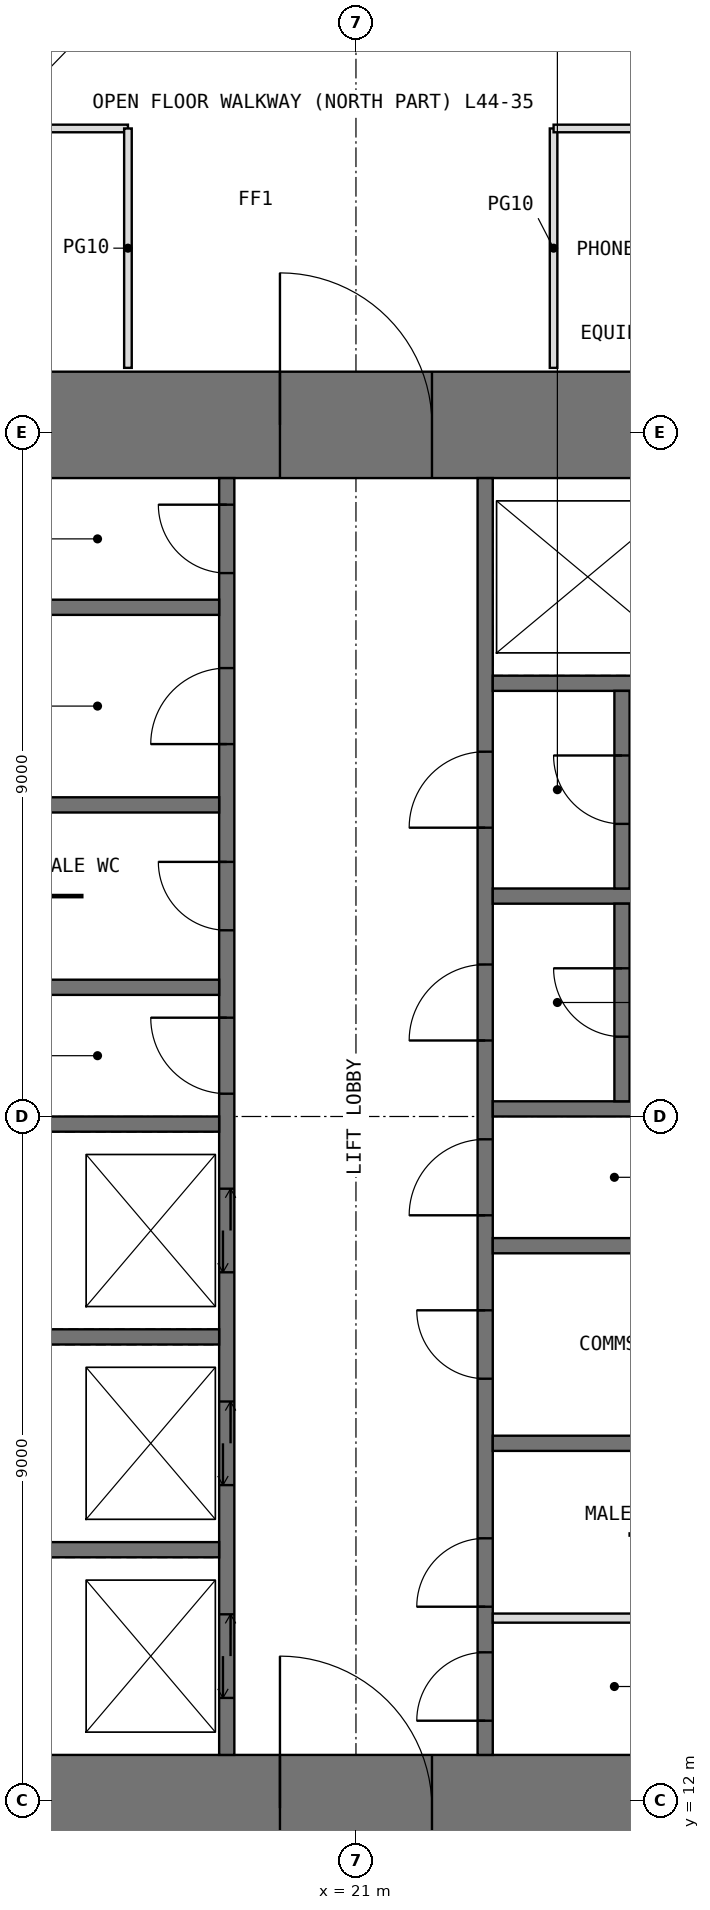
"""IFC4 building model, lengths in metres.
Left out: names, types, materials, properties, quantities, classifications, styles, units other than length and angle.
Written with IfcOpenShell. Run it as: python <this file> out.ifc"""

import sys

from ifc_helpers import new_model, si_unit, direction, frame, frame_2d, origin, place, context, subcontext, project, spatial, rectangle, extrude, element, fill, save


model = new_model("IFC4")
c1 = context("Model", 3, precision=1e-05, world=origin(), true_north=direction((0.0, 1.0)))
c2 = subcontext(c1, "Body", "Model", "MODEL_VIEW")
j1 = project(units=[si_unit("LENGTHUNIT", "METRE"), si_unit("PLANEANGLEUNIT", "RADIAN")], contexts=[c1])
p1 = place(None, origin())
s1 = spatial("IfcSite", under=j1, at=p1, CompositionType="ELEMENT")
p2 = place(p1, origin())
s2 = spatial("IfcBuilding", under=s1, at=p2, CompositionType="ELEMENT")
p3 = place(p2, frame((0.0, 0.0, 186.5)))
s3 = spatial("IfcBuildingStorey", under=s2, at=p3, CompositionType="ELEMENT", Elevation=186.5)
p4 = place(p3, frame((11.2, 11.9, -0.05), z_axis=(0.0, 0.0, 1.0), x_axis=(1.0, 0.0, 0.0)))
e1 = element("IfcWall", 1, at=p4, inside=s3, PredefinedType="SHEAR", context=c2, shape_type="SweptSolid", body=[
    extrude(rectangle(XDim=19.6, YDim=1.4, at=frame_2d((9.8, 0.0))), origin(), (0.0, 0.0, 1.0), 4.0),
])
p5 = place(p4, frame((8.8, 0.0, 0.05)))
e2 = element("IfcOpeningElement", 2, at=p5, cuts=e1, PredefinedType="OPENING", context=c2, shape_type="SweptSolid", body=[
    extrude(rectangle(XDim=2.0, YDim=2.2, at=frame_2d((1.0, 1.1))), frame((0.0, 0.71, 0.0), z_axis=(0.0, -1.0, 0.0), x_axis=(1.0, 0.0, 0.0)), (0.0, 0.0, 1.0), 1.42),
])
p6 = place(p3, frame((11.2, 30.1, -0.05), z_axis=(0.0, 0.0, 1.0), x_axis=(1.0, 0.0, 0.0)))
e3 = element("IfcWall", 3, at=p6, inside=s3, PredefinedType="SHEAR", context=c2, shape_type="SweptSolid", body=[
    extrude(rectangle(XDim=19.6, YDim=1.4, at=frame_2d((9.8, 0.0))), origin(), (0.0, 0.0, 1.0), 4.0),
])
p7 = place(p6, frame((8.8, 0.0, 0.05)))
e4 = element("IfcOpeningElement", 4, at=p7, cuts=e3, PredefinedType="OPENING", context=c2, shape_type="SweptSolid", body=[
    extrude(rectangle(XDim=2.0, YDim=2.2, at=frame_2d((1.0, 1.1))), frame((0.0, 0.71, 0.0), z_axis=(0.0, -1.0, 0.0), x_axis=(1.0, 0.0, 0.0)), (0.0, 0.0, 1.0), 1.42),
])
p8 = place(p3, frame((19.3, 12.6, -0.05), z_axis=(0.0, 0.0, 1.0), x_axis=(0.0, 1.0, 0.0)))
e5 = element("IfcWall", 5, at=p8, inside=s3, PredefinedType="SHEAR", context=c2, shape_type="SweptSolid", body=[
    extrude(rectangle(XDim=16.8, YDim=0.2, at=frame_2d((8.4, 0.0))), origin(), (0.0, 0.0, 1.0), 4.0),
])
p9 = place(p8, frame((8.7, 0.0, 0.05)))
e6 = element("IfcOpeningElement", 6, at=p9, cuts=e5, PredefinedType="OPENING", context=c2, shape_type="SweptSolid", body=[
    extrude(rectangle(XDim=1.0, YDim=2.2, at=frame_2d((0.5, 1.1))), frame((0.0, 0.11, 0.0), z_axis=(0.0, -1.0, 0.0), x_axis=(1.0, 0.0, 0.0)), (0.0, 0.0, 1.0), 0.22),
])
p10 = place(p8, frame((10.85, 0.0, 0.05)))
e7 = element("IfcOpeningElement", 7, at=p10, cuts=e5, PredefinedType="OPENING", context=c2, shape_type="SweptSolid", body=[
    extrude(rectangle(XDim=0.9, YDim=2.2, at=frame_2d((0.45, 1.1))), frame((0.0, 0.11, 0.0), z_axis=(0.0, -1.0, 0.0), x_axis=(1.0, 0.0, 0.0)), (0.0, 0.0, 1.0), 0.22),
])
p11 = place(p8, frame((13.3, 0.0, 0.05)))
e8 = element("IfcOpeningElement", 8, at=p11, cuts=e5, PredefinedType="OPENING", context=c2, shape_type="SweptSolid", body=[
    extrude(rectangle(XDim=1.0, YDim=2.2, at=frame_2d((0.5, 1.1))), frame((0.0, 0.11, 0.0), z_axis=(0.0, -1.0, 0.0), x_axis=(1.0, 0.0, 0.0)), (0.0, 0.0, 1.0), 0.22),
])
p12 = place(p8, frame((15.55, 0.0, 0.05)))
e9 = element("IfcOpeningElement", 9, at=p12, cuts=e5, PredefinedType="OPENING", context=c2, shape_type="SweptSolid", body=[
    extrude(rectangle(XDim=0.9, YDim=2.2, at=frame_2d((0.45, 1.1))), frame((0.0, 0.11, 0.0), z_axis=(0.0, -1.0, 0.0), x_axis=(1.0, 0.0, 0.0)), (0.0, 0.0, 1.0), 0.22),
])
p13 = place(p8, frame((0.75, 0.0, 0.05)))
e10 = element("IfcOpeningElement", 10, at=p13, cuts=e5, PredefinedType="OPENING", context=c2, shape_type="SweptSolid", body=[
    extrude(rectangle(XDim=1.1, YDim=2.2, at=frame_2d((0.55, 1.1))), frame((0.0, 0.11, 0.0), z_axis=(0.0, -1.0, 0.0), x_axis=(1.0, 0.0, 0.0)), (0.0, 0.0, 1.0), 0.22),
])
p14 = place(p8, frame((3.55, 0.0, 0.05)))
e11 = element("IfcOpeningElement", 11, at=p14, cuts=e5, PredefinedType="OPENING", context=c2, shape_type="SweptSolid", body=[
    extrude(rectangle(XDim=1.1, YDim=2.2, at=frame_2d((0.55, 1.1))), frame((0.0, 0.11, 0.0), z_axis=(0.0, -1.0, 0.0), x_axis=(1.0, 0.0, 0.0)), (0.0, 0.0, 1.0), 0.22),
])
p15 = place(p8, frame((6.35, 0.0, 0.05)))
e12 = element("IfcOpeningElement", 12, at=p15, cuts=e5, PredefinedType="OPENING", context=c2, shape_type="SweptSolid", body=[
    extrude(rectangle(XDim=1.1, YDim=2.2, at=frame_2d((0.55, 1.1))), frame((0.0, 0.11, 0.0), z_axis=(0.0, -1.0, 0.0), x_axis=(1.0, 0.0, 0.0)), (0.0, 0.0, 1.0), 0.22),
])
p16 = place(p3, frame((22.7, 12.6, -0.05), z_axis=(0.0, 0.0, 1.0), x_axis=(0.0, 1.0, 0.0)))
e13 = element("IfcWall", 13, at=p16, inside=s3, PredefinedType="SHEAR", context=c2, shape_type="SweptSolid", body=[
    extrude(rectangle(XDim=16.8, YDim=0.2, at=frame_2d((8.4, 0.0))), origin(), (0.0, 0.0, 1.0), 4.0),
])
p17 = place(p16, frame((0.45, 0.0, 0.05)))
e14 = element("IfcOpeningElement", 14, at=p17, cuts=e13, PredefinedType="OPENING", context=c2, shape_type="SweptSolid", body=[
    extrude(rectangle(XDim=0.9, YDim=2.2, at=frame_2d((0.45, 1.1))), frame((0.0, 0.11, 0.0), z_axis=(0.0, -1.0, 0.0), x_axis=(1.0, 0.0, 0.0)), (0.0, 0.0, 1.0), 0.22),
])
p18 = place(p16, frame((7.1, 0.0, 0.05)))
e15 = element("IfcOpeningElement", 15, at=p18, cuts=e13, PredefinedType="OPENING", context=c2, shape_type="SweptSolid", body=[
    extrude(rectangle(XDim=1.0, YDim=2.2, at=frame_2d((0.5, 1.1))), frame((0.0, 0.11, 0.0), z_axis=(0.0, -1.0, 0.0), x_axis=(1.0, 0.0, 0.0)), (0.0, 0.0, 1.0), 0.22),
])
p19 = place(p16, frame((1.95, 0.0, 0.05)))
e16 = element("IfcOpeningElement", 16, at=p19, cuts=e13, PredefinedType="OPENING", context=c2, shape_type="SweptSolid", body=[
    extrude(rectangle(XDim=0.9, YDim=2.2, at=frame_2d((0.45, 1.1))), frame((0.0, 0.11, 0.0), z_axis=(0.0, -1.0, 0.0), x_axis=(1.0, 0.0, 0.0)), (0.0, 0.0, 1.0), 0.22),
])
p20 = place(p16, frame((4.95, 0.0, 0.05)))
e17 = element("IfcOpeningElement", 17, at=p20, cuts=e13, PredefinedType="OPENING", context=c2, shape_type="SweptSolid", body=[
    extrude(rectangle(XDim=0.9, YDim=2.2, at=frame_2d((0.45, 1.1))), frame((0.0, 0.11, 0.0), z_axis=(0.0, -1.0, 0.0), x_axis=(1.0, 0.0, 0.0)), (0.0, 0.0, 1.0), 0.22),
])
p21 = place(p16, frame((9.4, 0.0, 0.05)))
e18 = element("IfcOpeningElement", 18, at=p21, cuts=e13, PredefinedType="OPENING", context=c2, shape_type="SweptSolid", body=[
    extrude(rectangle(XDim=1.0, YDim=2.2, at=frame_2d((0.5, 1.1))), frame((0.0, 0.11, 0.0), z_axis=(0.0, -1.0, 0.0), x_axis=(1.0, 0.0, 0.0)), (0.0, 0.0, 1.0), 0.22),
])
p22 = place(p16, frame((12.2, 0.0, 0.05)))
e19 = element("IfcOpeningElement", 19, at=p22, cuts=e13, PredefinedType="OPENING", context=c2, shape_type="SweptSolid", body=[
    extrude(rectangle(XDim=1.0, YDim=2.2, at=frame_2d((0.5, 1.1))), frame((0.0, 0.11, 0.0), z_axis=(0.0, -1.0, 0.0), x_axis=(1.0, 0.0, 0.0)), (0.0, 0.0, 1.0), 0.22),
])
for number, where, z_axis, x_axis in (
    (20, (16.0, 15.3, -0.05), (0.0, 0.0, 1.0), (1.0, 0.0, 0.0)),
    (21, (16.0, 18.1, -0.05), (0.0, 0.0, 1.0), (1.0, 0.0, 0.0)),
    (22, (16.0, 20.9, -0.05), (0.0, 0.0, 1.0), (1.0, 0.0, 0.0)),
    (23, (16.0, 22.7, -0.05), (0.0, 0.0, 1.0), (1.0, 0.0, 0.0)),
    (24, (16.0, 25.1, -0.05), (0.0, 0.0, 1.0), (1.0, 0.0, 0.0)),
    (25, (16.0, 27.7, -0.05), (0.0, 0.0, 1.0), (1.0, 0.0, 0.0)),
    (26, (22.8, 16.7, -0.05), (0.0, 0.0, 1.0), (1.0, 0.0, 0.0)),
    (27, (22.8, 19.3, -0.05), (0.0, 0.0, 1.0), (1.0, 0.0, 0.0)),
    (28, (22.8, 21.1, -0.05), (0.0, 0.0, 1.0), (1.0, 0.0, 0.0)),
    (29, (22.8, 23.9, -0.05), (0.0, 0.0, 1.0), (1.0, 0.0, 0.0)),
    (30, (22.8, 26.7, -0.05), (0.0, 0.0, 1.0), (1.0, 0.0, 0.0)),
):
    element("IfcWall", number, at=place(p3, frame(where, z_axis=z_axis, x_axis=x_axis)), inside=s3, PredefinedType="SHEAR", context=c2, shape_type="SweptSolid", body=[
        extrude(rectangle(XDim=3.2, YDim=0.2, at=frame_2d((1.6, 0.0))), origin(), (0.0, 0.0, 1.0), 4.0),
    ])
p23 = place(p3, frame((22.8, 14.4, 0.0), z_axis=(0.0, 0.0, 1.0), x_axis=(1.0, 0.0, 0.0)))
e31 = element("IfcWall", 31, at=p23, inside=s3, PredefinedType="PARTITIONING", context=c2, shape_type="SweptSolid", body=[
    extrude(rectangle(XDim=3.2, YDim=0.12, at=frame_2d((1.6, 0.0))), origin(), (0.0, 0.0, 1.0), 3.75),
])
p24 = place(p3, frame((16.0, 23.9, 0.0), z_axis=(0.0, 0.0, 1.0), x_axis=(1.0, 0.0, 0.0)))
e32 = element("IfcWall", 32, at=p24, inside=s3, PredefinedType="PARTITIONING", context=c2, shape_type="SweptSolid", body=[
    extrude(rectangle(XDim=1.4, YDim=0.03, at=frame_2d((0.7, 0.0))), origin(), (0.0, 0.0, 1.0), 3.75),
])
p25 = place(p3, frame((24.5, 21.2, -0.05), z_axis=(0.0, 0.0, 1.0), x_axis=(0.0, 1.0, 0.0)))
e33 = element("IfcWall", 33, at=p25, inside=s3, PredefinedType="SHEAR", context=c2, shape_type="SweptSolid", body=[
    extrude(rectangle(XDim=2.6, YDim=0.2, at=frame_2d((1.3, 0.0))), origin(), (0.0, 0.0, 1.0), 4.0),
])
p26 = place(p25, frame((0.85, 0.0, 0.05)))
e34 = element("IfcOpeningElement", 34, at=p26, cuts=e33, PredefinedType="OPENING", context=c2, shape_type="SweptSolid", body=[
    extrude(rectangle(XDim=0.9, YDim=2.2, at=frame_2d((0.45, 1.1))), frame((0.0, 0.11, 0.0), z_axis=(0.0, -1.0, 0.0), x_axis=(1.0, 0.0, 0.0)), (0.0, 0.0, 1.0), 0.22),
])
p27 = place(p3, frame((24.5, 24.0, -0.05), z_axis=(0.0, 0.0, 1.0), x_axis=(0.0, 1.0, 0.0)))
e35 = element("IfcWall", 35, at=p27, inside=s3, PredefinedType="SHEAR", context=c2, shape_type="SweptSolid", body=[
    extrude(rectangle(XDim=2.6, YDim=0.2, at=frame_2d((1.3, 0.0))), origin(), (0.0, 0.0, 1.0), 4.0),
])
p28 = place(p27, frame((0.85, 0.0, 0.05)))
e36 = element("IfcOpeningElement", 36, at=p28, cuts=e35, PredefinedType="OPENING", context=c2, shape_type="SweptSolid", body=[
    extrude(rectangle(XDim=0.9, YDim=2.2, at=frame_2d((0.45, 1.1))), frame((0.0, 0.11, 0.0), z_axis=(0.0, -1.0, 0.0), x_axis=(1.0, 0.0, 0.0)), (0.0, 0.0, 1.0), 0.22),
])
p29 = place(p3, frame((14.4, 34.0, 0.0), z_axis=(0.0, 0.0, 1.0), x_axis=(1.0, 0.0, 0.0)))
e37 = element("IfcWall", 37, at=p29, inside=s3, PredefinedType="PARTITIONING", context=c2, shape_type="SweptSolid", body=[
    extrude(rectangle(XDim=3.6, YDim=0.1, at=frame_2d((1.8, 0.0))), origin(), (0.0, 0.0, 1.0), 3.75),
])
p30 = place(p29, frame((1.3, 0.0, 0.0)))
e38 = element("IfcOpeningElement", 38, at=p30, cuts=e37, PredefinedType="OPENING", context=c2, shape_type="SweptSolid", body=[
    extrude(rectangle(XDim=1.0, YDim=2.4, at=frame_2d((0.5, 1.2))), frame((0.0, 0.06, 0.0), z_axis=(0.0, -1.0, 0.0), x_axis=(1.0, 0.0, 0.0)), (0.0, 0.0, 1.0), 0.12),
])
for number, where, z_axis, x_axis in (
    (39, (18.0, 30.85, 0.0), (0.0, 0.0, 1.0), (0.0, 1.0, 0.0)),
    (40, (23.6, 30.85, 0.0), (0.0, 0.0, 1.0), (0.0, 1.0, 0.0)),
):
    element("IfcWall", number, at=place(p3, frame(where, z_axis=z_axis, x_axis=x_axis)), inside=s3, PredefinedType="PARTITIONING", context=c2, shape_type="SweptSolid", body=[
        extrude(rectangle(XDim=3.15, YDim=0.1, at=frame_2d((1.575, 0.0))), origin(), (0.0, 0.0, 1.0), 3.75),
    ])
p31 = place(p3, frame((23.6, 34.0, 0.0), z_axis=(0.0, 0.0, 1.0), x_axis=(1.0, 0.0, 0.0)))
e41 = element("IfcWall", 41, at=p31, inside=s3, PredefinedType="PARTITIONING", context=c2, shape_type="SweptSolid", body=[
    extrude(rectangle(XDim=3.2, YDim=0.1, at=frame_2d((1.6, 0.0))), origin(), (0.0, 0.0, 1.0), 3.75),
])
p32 = place(p31, frame((1.1, 0.0, 0.0)))
e42 = element("IfcOpeningElement", 42, at=p32, cuts=e41, PredefinedType="OPENING", context=c2, shape_type="SweptSolid", body=[
    extrude(rectangle(XDim=1.0, YDim=2.4, at=frame_2d((0.5, 1.2))), frame((0.0, 0.06, 0.0), z_axis=(0.0, -1.0, 0.0), x_axis=(1.0, 0.0, 0.0)), (0.0, 0.0, 1.0), 0.12),
])
p33 = place(p5, origin())
e43 = element("IfcDoor", 43, at=p33, inside=s3, OperationType="DOUBLE_DOOR_SINGLE_SWING", PredefinedType="DOOR", context=c2, shape_type="SweptSolid", body=[
    extrude(rectangle(XDim=2.0, YDim=2.2, at=frame_2d((1.0, 1.1))), frame((0.0, 0.025, 0.0), z_axis=(0.0, -1.0, 0.0), x_axis=(1.0, 0.0, 0.0)), (0.0, 0.0, 1.0), 0.05),
])
fill(e2, e43)
p34 = place(p7, origin())
e44 = element("IfcDoor", 44, at=p34, inside=s3, OperationType="DOUBLE_DOOR_SINGLE_SWING", PredefinedType="DOOR", context=c2, shape_type="SweptSolid", body=[
    extrude(rectangle(XDim=2.0, YDim=2.2, at=frame_2d((1.0, 1.1))), frame((0.0, 0.025, 0.0), z_axis=(0.0, -1.0, 0.0), x_axis=(1.0, 0.0, 0.0)), (0.0, 0.0, 1.0), 0.05),
])
fill(e4, e44)
p35 = place(p17, origin())
e45 = element("IfcDoor", 45, at=p35, inside=s3, OperationType="SINGLE_SWING_LEFT", PredefinedType="DOOR", context=c2, shape_type="SweptSolid", body=[
    extrude(rectangle(XDim=0.9, YDim=2.2, at=frame_2d((0.45, 1.1))), frame((0.0, 0.025, 0.0), z_axis=(0.0, -1.0, 0.0), x_axis=(1.0, 0.0, 0.0)), (0.0, 0.0, 1.0), 0.05),
])
fill(e14, e45)
p36 = place(p9, origin())
e46 = element("IfcDoor", 46, at=p36, inside=s3, OperationType="SINGLE_SWING_RIGHT", PredefinedType="DOOR", context=c2, shape_type="SweptSolid", body=[
    extrude(rectangle(XDim=1.0, YDim=2.2, at=frame_2d((0.5, 1.1))), frame((0.0, 0.025, 0.0), z_axis=(0.0, -1.0, 0.0), x_axis=(1.0, 0.0, 0.0)), (0.0, 0.0, 1.0), 0.05),
])
fill(e6, e46)
p37 = place(p18, origin())
e47 = element("IfcDoor", 47, at=p37, inside=s3, OperationType="SINGLE_SWING_LEFT", PredefinedType="DOOR", context=c2, shape_type="SweptSolid", body=[
    extrude(rectangle(XDim=1.0, YDim=2.2, at=frame_2d((0.5, 1.1))), frame((0.0, 0.025, 0.0), z_axis=(0.0, -1.0, 0.0), x_axis=(1.0, 0.0, 0.0)), (0.0, 0.0, 1.0), 0.05),
])
fill(e15, e47)
p38 = place(p10, origin())
e48 = element("IfcDoor", 48, at=p38, inside=s3, OperationType="SINGLE_SWING_RIGHT", PredefinedType="DOOR", context=c2, shape_type="SweptSolid", body=[
    extrude(rectangle(XDim=0.9, YDim=2.2, at=frame_2d((0.45, 1.1))), frame((0.0, 0.025, 0.0), z_axis=(0.0, -1.0, 0.0), x_axis=(1.0, 0.0, 0.0)), (0.0, 0.0, 1.0), 0.05),
])
fill(e7, e48)
p39 = place(p11, origin())
e49 = element("IfcDoor", 49, at=p39, inside=s3, OperationType="SINGLE_SWING_LEFT", PredefinedType="DOOR", context=c2, shape_type="SweptSolid", body=[
    extrude(rectangle(XDim=1.0, YDim=2.2, at=frame_2d((0.5, 1.1))), frame((0.0, 0.025, 0.0), z_axis=(0.0, -1.0, 0.0), x_axis=(1.0, 0.0, 0.0)), (0.0, 0.0, 1.0), 0.05),
])
fill(e8, e49)
p40 = place(p12, origin())
e50 = element("IfcDoor", 50, at=p40, inside=s3, OperationType="SINGLE_SWING_RIGHT", PredefinedType="DOOR", context=c2, shape_type="SweptSolid", body=[
    extrude(rectangle(XDim=0.9, YDim=2.2, at=frame_2d((0.45, 1.1))), frame((0.0, 0.025, 0.0), z_axis=(0.0, -1.0, 0.0), x_axis=(1.0, 0.0, 0.0)), (0.0, 0.0, 1.0), 0.05),
])
fill(e9, e50)
p41 = place(p19, origin())
e51 = element("IfcDoor", 51, at=p41, inside=s3, OperationType="SINGLE_SWING_LEFT", PredefinedType="DOOR", context=c2, shape_type="SweptSolid", body=[
    extrude(rectangle(XDim=0.9, YDim=2.2, at=frame_2d((0.45, 1.1))), frame((0.0, 0.025, 0.0), z_axis=(0.0, -1.0, 0.0), x_axis=(1.0, 0.0, 0.0)), (0.0, 0.0, 1.0), 0.05),
])
fill(e16, e51)
p42 = place(p20, origin())
e52 = element("IfcDoor", 52, at=p42, inside=s3, OperationType="SINGLE_SWING_RIGHT", PredefinedType="DOOR", context=c2, shape_type="SweptSolid", body=[
    extrude(rectangle(XDim=0.9, YDim=2.2, at=frame_2d((0.45, 1.1))), frame((0.0, 0.025, 0.0), z_axis=(0.0, -1.0, 0.0), x_axis=(1.0, 0.0, 0.0)), (0.0, 0.0, 1.0), 0.05),
])
fill(e17, e52)
p43 = place(p21, origin())
e53 = element("IfcDoor", 53, at=p43, inside=s3, OperationType="SINGLE_SWING_LEFT", PredefinedType="DOOR", context=c2, shape_type="SweptSolid", body=[
    extrude(rectangle(XDim=1.0, YDim=2.2, at=frame_2d((0.5, 1.1))), frame((0.0, 0.025, 0.0), z_axis=(0.0, -1.0, 0.0), x_axis=(1.0, 0.0, 0.0)), (0.0, 0.0, 1.0), 0.05),
])
fill(e18, e53)
p44 = place(p26, origin())
e54 = element("IfcDoor", 54, at=p44, inside=s3, OperationType="SINGLE_SWING_RIGHT", PredefinedType="DOOR", context=c2, shape_type="SweptSolid", body=[
    extrude(rectangle(XDim=0.9, YDim=2.2, at=frame_2d((0.45, 1.1))), frame((0.0, 0.025, 0.0), z_axis=(0.0, -1.0, 0.0), x_axis=(1.0, 0.0, 0.0)), (0.0, 0.0, 1.0), 0.05),
])
fill(e34, e54)
p45 = place(p22, origin())
e55 = element("IfcDoor", 55, at=p45, inside=s3, OperationType="SINGLE_SWING_LEFT", PredefinedType="DOOR", context=c2, shape_type="SweptSolid", body=[
    extrude(rectangle(XDim=1.0, YDim=2.2, at=frame_2d((0.5, 1.1))), frame((0.0, 0.025, 0.0), z_axis=(0.0, -1.0, 0.0), x_axis=(1.0, 0.0, 0.0)), (0.0, 0.0, 1.0), 0.05),
])
fill(e19, e55)
p46 = place(p28, origin())
e56 = element("IfcDoor", 56, at=p46, inside=s3, OperationType="SINGLE_SWING_RIGHT", PredefinedType="DOOR", context=c2, shape_type="SweptSolid", body=[
    extrude(rectangle(XDim=0.9, YDim=2.2, at=frame_2d((0.45, 1.1))), frame((0.0, 0.025, 0.0), z_axis=(0.0, -1.0, 0.0), x_axis=(1.0, 0.0, 0.0)), (0.0, 0.0, 1.0), 0.05),
])
fill(e36, e56)
p47 = place(p13, origin())
e57 = element("IfcDoor", 57, at=p47, inside=s3, OperationType="DOUBLE_DOOR_SLIDING", PredefinedType="DOOR", context=c2, shape_type="SweptSolid", body=[
    extrude(rectangle(XDim=1.1, YDim=2.2, at=frame_2d((0.55, 1.1))), frame((0.0, 0.025, 0.0), z_axis=(0.0, -1.0, 0.0), x_axis=(1.0, 0.0, 0.0)), (0.0, 0.0, 1.0), 0.05),
])
fill(e10, e57)
p48 = place(p14, origin())
e58 = element("IfcDoor", 58, at=p48, inside=s3, OperationType="DOUBLE_DOOR_SLIDING", PredefinedType="DOOR", context=c2, shape_type="SweptSolid", body=[
    extrude(rectangle(XDim=1.1, YDim=2.2, at=frame_2d((0.55, 1.1))), frame((0.0, 0.025, 0.0), z_axis=(0.0, -1.0, 0.0), x_axis=(1.0, 0.0, 0.0)), (0.0, 0.0, 1.0), 0.05),
])
fill(e11, e58)
p49 = place(p15, origin())
e59 = element("IfcDoor", 59, at=p49, inside=s3, OperationType="DOUBLE_DOOR_SLIDING", PredefinedType="DOOR", context=c2, shape_type="SweptSolid", body=[
    extrude(rectangle(XDim=1.1, YDim=2.2, at=frame_2d((0.55, 1.1))), frame((0.0, 0.025, 0.0), z_axis=(0.0, -1.0, 0.0), x_axis=(1.0, 0.0, 0.0)), (0.0, 0.0, 1.0), 0.05),
])
fill(e12, e59)
save(model, sys.argv[1])
